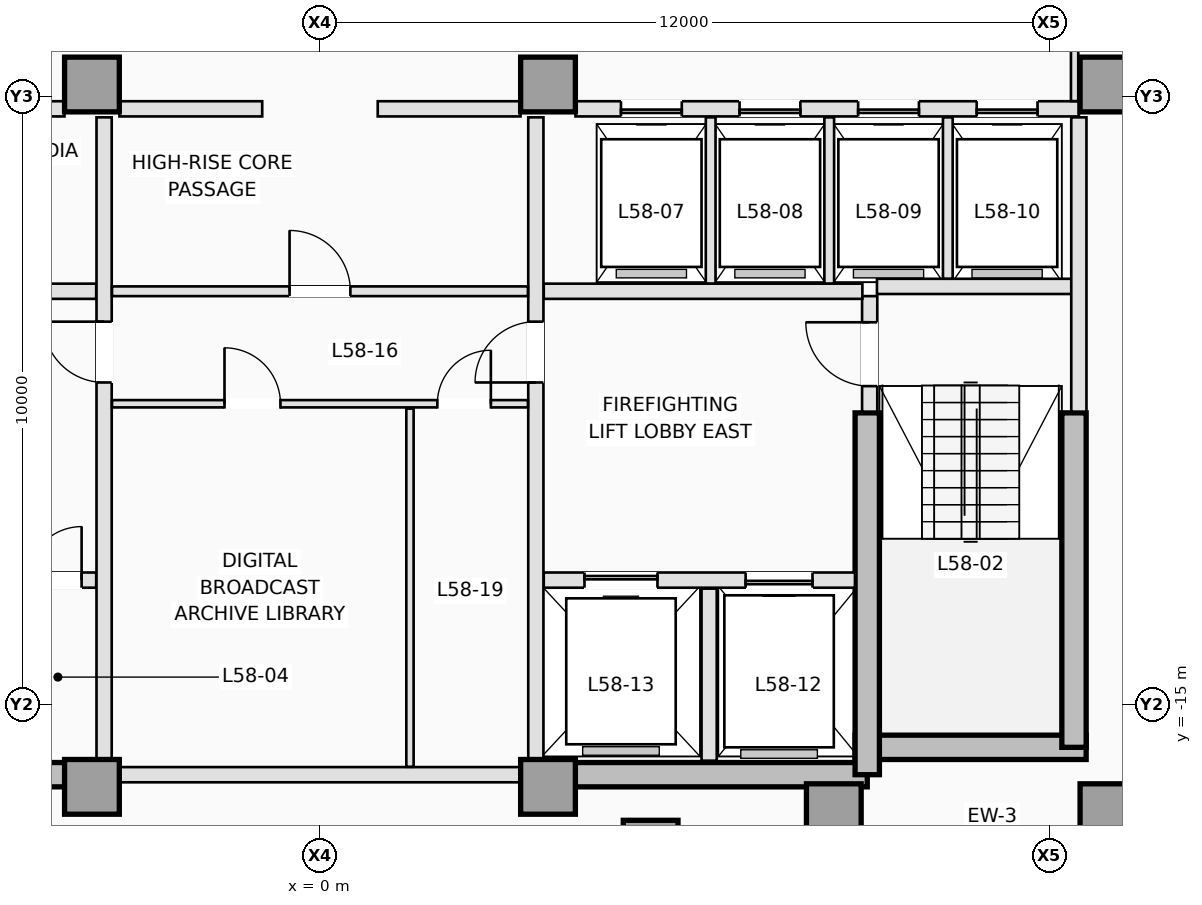
"""IFC4 building model, lengths in metres.
Left out: names, types, materials, properties, quantities, classifications, styles, units other than length and angle.
Written with IfcOpenShell. Run it as: python <this file> out.ifc"""

import sys

from ifc_helpers import new_model, si_unit, direction, frame, frame_2d, origin, origin_2d, place, context, subcontext, project, spatial, rectangle, extrude, element, fill, save


model = new_model("IFC4")
c1 = context("Model", 3, precision=1e-05, world=origin(), true_north=direction((0.0, 1.0)))
c2 = subcontext(c1, "Body", "Model", "MODEL_VIEW")
j1 = project(units=[si_unit("LENGTHUNIT", "METRE"), si_unit("PLANEANGLEUNIT", "RADIAN")], contexts=[c1])
p1 = place(None, origin())
s1 = spatial("IfcSite", under=j1, at=p1, CompositionType="ELEMENT")
p2 = place(p1, origin())
s2 = spatial("IfcBuilding", under=s1, at=p2, CompositionType="ELEMENT")
p3 = place(p2, frame((0.0, 0.0, 211.4)))
s3 = spatial("IfcBuildingStorey", under=s2, at=p3, CompositionType="ELEMENT", Elevation=211.4)
for number, where, z_axis, x_axis in (
    (1, (-9.0, -16.15, 0.0), (0.0, 0.0, 1.0), (1.0, 0.0, 0.0)),
    (2, (3.75, -16.15, 0.0), (0.0, 0.0, 1.0), (1.0, 0.0, 0.0)),
):
    element("IfcWall", number, at=place(p3, frame(where, z_axis=z_axis, x_axis=x_axis)), inside=s3, PredefinedType="SHEAR", context=c2, shape_type="SweptSolid", body=[
        extrude(rectangle(XDim=5.25, YDim=0.4, at=frame_2d((2.625, 0.0))), origin(), (0.0, 0.0, 1.0), 3.5),
    ])
p4 = place(p3, frame((8.8, -15.7, 0.0), z_axis=(0.0, 0.0, 1.0), x_axis=(1.0, 0.0, 0.0)))
e3 = element("IfcWall", 3, at=p4, inside=s3, PredefinedType="SHEAR", context=c2, shape_type="SweptSolid", body=[
    extrude(rectangle(XDim=3.8, YDim=0.4, at=frame_2d((1.9, 0.0))), origin(), (0.0, 0.0, 1.0), 3.5),
])
p5 = place(p3, frame((12.4, -15.7, 0.0), z_axis=(0.0, 0.0, 1.0), x_axis=(0.0, 1.0, 0.0)))
e4 = element("IfcWall", 4, at=p5, inside=s3, PredefinedType="SHEAR", context=c2, shape_type="SweptSolid", body=[
    extrude(rectangle(XDim=5.5, YDim=0.4, at=frame_2d((2.75, 0.0))), origin(), (0.0, 0.0, 1.0), 3.5),
])
p6 = place(p3, frame((9.0, -16.15, 0.0), z_axis=(0.0, 0.0, 1.0), x_axis=(0.0, 1.0, 0.0)))
e5 = element("IfcWall", 5, at=p6, inside=s3, PredefinedType="SHEAR", context=c2, shape_type="SweptSolid", body=[
    extrude(rectangle(XDim=5.95, YDim=0.4, at=frame_2d((2.975, 0.0))), origin(), (0.0, 0.0, 1.0), 3.5),
])
for number, where, z_axis, x_axis in (
    (6, (-3.75, -16.35, 0.0), (0.0, 0.0, 1.0), (1.0, 0.0, 0.0)),
    (7, (3.75, -16.35, 0.0), (0.0, 0.0, 1.0), (1.0, 0.0, 0.0)),
    (8, (8.45, -16.75, 0.0), (0.0, 0.0, 1.0), (1.0, 0.0, 0.0)),
    (9, (12.95, -16.75, 0.0), (0.0, 0.0, 1.0), (1.0, 0.0, 0.0)),
    (10, (-3.75, -4.8, 0.0), (0.0, 0.0, 1.0), (1.0, 0.0, 0.0)),
    (11, (3.75, -4.8, 0.0), (0.0, 0.0, 1.0), (1.0, 0.0, 0.0)),
    (12, (12.95, -4.8, 0.0), (0.0, 0.0, 1.0), (1.0, 0.0, 0.0)),
    (13, (5.438, -17.35, 0.0), (0.0, 0.0, 1.0), (0.0, 1.0, 0.0)),
):
    element("IfcColumn", number, at=place(p3, frame(where, z_axis=z_axis, x_axis=x_axis)), inside=s3, PredefinedType="COLUMN", context=c2, shape_type="SweptSolid", body=[
        extrude(rectangle(XDim=0.9, YDim=0.9, at=origin_2d()), origin(), (0.0, 0.0, 1.0), 3.5),
    ])
p7 = place(p3, frame((9.04, -10.18, 0.0), z_axis=(0.0, 0.0, 1.0), x_axis=(0.0, 1.0, 0.0)))
e14 = element("IfcWall", 14, at=p7, inside=s3, PredefinedType="PARTITIONING", context=c2, shape_type="SweptSolid", body=[
    extrude(rectangle(XDim=1.9, YDim=0.25, at=frame_2d((0.95, 0.0))), origin(), (0.0, 0.0, 1.0), 3.25),
])
p8 = place(p7, frame((0.42, 0.0, 0.0)))
e15 = element("IfcOpeningElement", 15, at=p8, cuts=e14, PredefinedType="OPENING", context=c2, shape_type="SweptSolid", body=[
    extrude(rectangle(XDim=1.05, YDim=2.15, at=frame_2d((0.525, 1.075))), frame((0.0, 0.135, 0.0), z_axis=(0.0, -1.0, 0.0), x_axis=(1.0, 0.0, 0.0)), (0.0, 0.0, 1.0), 0.27),
])
p9 = place(p3, frame((9.16, -8.12, 0.0), z_axis=(0.0, 0.0, 1.0), x_axis=(1.0, 0.0, 0.0)))
e16 = element("IfcWall", 16, at=p9, inside=s3, PredefinedType="PARTITIONING", context=c2, shape_type="SweptSolid", body=[
    extrude(rectangle(XDim=3.22, YDim=0.25, at=frame_2d((1.61, 0.0))), origin(), (0.0, 0.0, 1.0), 3.25),
])
p10 = place(p3, frame((12.48, -10.18, 0.0), z_axis=(0.0, 0.0, 1.0), x_axis=(0.0, 1.0, 0.0)))
e17 = element("IfcWall", 17, at=p10, inside=s3, PredefinedType="PARTITIONING", context=c2, shape_type="SweptSolid", body=[
    extrude(rectangle(XDim=4.84, YDim=0.25, at=frame_2d((2.42, 0.0))), origin(), (0.0, 0.0, 1.0), 3.25),
])
p11 = place(p3, frame((-8.798, -12.95, 0.0), z_axis=(0.0, 0.0, 1.0), x_axis=(1.0, 0.0, 0.0)))
e18 = element("IfcWall", 18, at=p11, inside=s3, PredefinedType="PARTITIONING", context=c2, shape_type="SweptSolid", body=[
    extrude(rectangle(XDim=5.118, YDim=0.25, at=frame_2d((2.559, 0.0))), origin(), (0.0, 0.0, 1.0), 3.25),
])
p12 = place(p11, frame((0.698, 0.0, 0.0)))
e19 = element("IfcOpeningElement", 19, at=p12, cuts=e18, PredefinedType="OPENING", context=c2, shape_type="SweptSolid", body=[
    extrude(rectangle(XDim=1.1, YDim=2.15, at=frame_2d((0.55, 1.075))), frame((0.0, 0.135, 0.0), z_axis=(0.0, -1.0, 0.0), x_axis=(1.0, 0.0, 0.0)), (0.0, 0.0, 1.0), 0.27),
])
p13 = place(p11, frame((2.598, 0.0, 0.0)))
e20 = element("IfcOpeningElement", 20, at=p13, cuts=e18, PredefinedType="OPENING", context=c2, shape_type="SweptSolid", body=[
    extrude(rectangle(XDim=0.88, YDim=2.1, at=frame_2d((0.44, 1.05))), frame((0.0, 0.135, 0.0), z_axis=(0.0, -1.0, 0.0), x_axis=(1.0, 0.0, 0.0)), (0.0, 0.0, 1.0), 0.27),
])
p14 = place(p11, frame((3.998, 0.0, 0.0)))
e21 = element("IfcOpeningElement", 21, at=p14, cuts=e18, PredefinedType="OPENING", context=c2, shape_type="SweptSolid", body=[
    extrude(rectangle(XDim=0.88, YDim=2.1, at=frame_2d((0.44, 1.05))), frame((0.0, 0.135, 0.0), z_axis=(0.0, -1.0, 0.0), x_axis=(1.0, 0.0, 0.0)), (0.0, 0.0, 1.0), 0.27),
])
p15 = place(p3, frame((3.68, -12.95, 0.0), z_axis=(0.0, 0.0, 1.0), x_axis=(1.0, 0.0, 0.0)))
e22 = element("IfcWall", 22, at=p15, inside=s3, PredefinedType="PARTITIONING", context=c2, shape_type="SweptSolid", body=[
    extrude(rectangle(XDim=5.118, YDim=0.25, at=frame_2d((2.559, 0.0))), origin(), (0.0, 0.0, 1.0), 3.25),
])
p16 = place(p15, frame((3.32, 0.0, 0.0)))
e23 = element("IfcOpeningElement", 23, at=p16, cuts=e22, PredefinedType="OPENING", context=c2, shape_type="SweptSolid", body=[
    extrude(rectangle(XDim=1.1, YDim=2.15, at=frame_2d((0.55, 1.075))), frame((0.0, 0.135, 0.0), z_axis=(0.0, -1.0, 0.0), x_axis=(1.0, 0.0, 0.0)), (0.0, 0.0, 1.0), 0.27),
])
p17 = place(p15, frame((0.67, 0.0, 0.0)))
e24 = element("IfcOpeningElement", 24, at=p17, cuts=e22, PredefinedType="OPENING", context=c2, shape_type="SweptSolid", body=[
    extrude(rectangle(XDim=1.2, YDim=2.15, at=frame_2d((0.6, 1.075))), frame((0.0, 0.135, 0.0), z_axis=(0.0, -1.0, 0.0), x_axis=(1.0, 0.0, 0.0)), (0.0, 0.0, 1.0), 0.27),
])
p18 = place(p3, frame((6.4, -15.92, 0.0), z_axis=(0.0, 0.0, 1.0), x_axis=(0.0, 1.0, 0.0)))
e25 = element("IfcWall", 25, at=p18, inside=s3, PredefinedType="PARTITIONING", context=c2, shape_type="SweptSolid", body=[
    extrude(rectangle(XDim=2.83, YDim=0.25, at=frame_2d((1.415, 0.0))), origin(), (0.0, 0.0, 1.0), 3.25),
])
for number, where, z_axis, x_axis in (
    (26, (-8.92, -8.2, 0.0), (0.0, 0.0, 1.0), (1.0, 0.0, 0.0)),
    (27, (3.68, -8.2, 0.0), (0.0, 0.0, 1.0), (1.0, 0.0, 0.0)),
):
    element("IfcWall", number, at=place(p3, frame(where, z_axis=z_axis, x_axis=x_axis)), inside=s3, PredefinedType="PARTITIONING", context=c2, shape_type="SweptSolid", body=[
        extrude(rectangle(XDim=5.24, YDim=0.25, at=frame_2d((2.62, 0.0))), origin(), (0.0, 0.0, 1.0), 3.25),
    ])
p19 = place(p3, frame((-3.55, -15.898, 0.0), z_axis=(0.0, 0.0, 1.0), x_axis=(0.0, 1.0, 0.0)))
e28 = element("IfcWall", 28, at=p19, inside=s3, PredefinedType="PARTITIONING", context=c2, shape_type="SweptSolid", body=[
    extrude(rectangle(XDim=10.558, YDim=0.25, at=frame_2d((5.279, 0.0))), origin(), (0.0, 0.0, 1.0), 3.25),
])
p20 = place(p19, frame((6.198, 0.0, 0.0)))
e29 = element("IfcOpeningElement", 29, at=p20, cuts=e28, PredefinedType="OPENING", context=c2, shape_type="SweptSolid", body=[
    extrude(rectangle(XDim=1.0, YDim=2.15, at=frame_2d((0.5, 1.075))), frame((0.0, 0.135, 0.0), z_axis=(0.0, -1.0, 0.0), x_axis=(1.0, 0.0, 0.0)), (0.0, 0.0, 1.0), 0.27),
])
p21 = place(p3, frame((3.55, -15.898, 0.0), z_axis=(0.0, 0.0, 1.0), x_axis=(0.0, 1.0, 0.0)))
e30 = element("IfcWall", 30, at=p21, inside=s3, PredefinedType="PARTITIONING", context=c2, shape_type="SweptSolid", body=[
    extrude(rectangle(XDim=10.558, YDim=0.25, at=frame_2d((5.279, 0.0))), origin(), (0.0, 0.0, 1.0), 3.25),
])
p22 = place(p21, frame((6.198, 0.0, 0.0)))
e31 = element("IfcOpeningElement", 31, at=p22, cuts=e30, PredefinedType="OPENING", context=c2, shape_type="SweptSolid", body=[
    extrude(rectangle(XDim=1.0, YDim=2.15, at=frame_2d((0.5, 1.075))), frame((0.0, 0.135, 0.0), z_axis=(0.0, -1.0, 0.0), x_axis=(1.0, 0.0, 0.0)), (0.0, 0.0, 1.0), 0.27),
])
p23 = place(p3, frame((-12.48, -5.2, 0.0), z_axis=(0.0, 0.0, 1.0), x_axis=(1.0, 0.0, 0.0)))
e32 = element("IfcWall", 32, at=p23, inside=s3, PredefinedType="PARTITIONING", context=c2, shape_type="SweptSolid", body=[
    extrude(rectangle(XDim=8.278, YDim=0.25, at=frame_2d((4.139, 0.0))), origin(), (0.0, 0.0, 1.0), 3.25),
])
p24 = place(p23, frame((3.05, 0.0, 0.0)))
e33 = element("IfcOpeningElement", 33, at=p24, cuts=e32, PredefinedType="OPENING", context=c2, shape_type="SweptSolid", body=[
    extrude(rectangle(XDim=0.92, YDim=2.12, at=frame_2d((0.46, 1.06))), frame((0.0, 0.135, 0.0), z_axis=(0.0, -1.0, 0.0), x_axis=(1.0, 0.0, 0.0)), (0.0, 0.0, 1.0), 0.27),
])
p25 = place(p23, frame((6.15, 0.0, 0.0)))
e34 = element("IfcOpeningElement", 34, at=p25, cuts=e32, PredefinedType="OPENING", context=c2, shape_type="SweptSolid", body=[
    extrude(rectangle(XDim=0.92, YDim=2.12, at=frame_2d((0.46, 1.06))), frame((0.0, 0.135, 0.0), z_axis=(0.0, -1.0, 0.0), x_axis=(1.0, 0.0, 0.0)), (0.0, 0.0, 1.0), 0.27),
])
p26 = place(p3, frame((4.202, -5.2, 0.0), z_axis=(0.0, 0.0, 1.0), x_axis=(1.0, 0.0, 0.0)))
e35 = element("IfcWall", 35, at=p26, inside=s3, PredefinedType="PARTITIONING", context=c2, shape_type="SweptSolid", body=[
    extrude(rectangle(XDim=8.278, YDim=0.25, at=frame_2d((4.139, 0.0))), origin(), (0.0, 0.0, 1.0), 3.25),
])
p27 = place(p26, frame((0.748, 0.0, 0.0)))
e36 = element("IfcOpeningElement", 36, at=p27, cuts=e35, PredefinedType="OPENING", context=c2, shape_type="SweptSolid", body=[
    extrude(rectangle(XDim=1.0, YDim=2.15, at=frame_2d((0.5, 1.075))), frame((0.0, 0.135, 0.0), z_axis=(0.0, -1.0, 0.0), x_axis=(1.0, 0.0, 0.0)), (0.0, 0.0, 1.0), 0.27),
])
p28 = place(p26, frame((2.698, 0.0, 0.0)))
e37 = element("IfcOpeningElement", 37, at=p28, cuts=e35, PredefinedType="OPENING", context=c2, shape_type="SweptSolid", body=[
    extrude(rectangle(XDim=1.0, YDim=2.15, at=frame_2d((0.5, 1.075))), frame((0.0, 0.135, 0.0), z_axis=(0.0, -1.0, 0.0), x_axis=(1.0, 0.0, 0.0)), (0.0, 0.0, 1.0), 0.27),
])
p29 = place(p26, frame((4.648, 0.0, 0.0)))
e38 = element("IfcOpeningElement", 38, at=p29, cuts=e35, PredefinedType="OPENING", context=c2, shape_type="SweptSolid", body=[
    extrude(rectangle(XDim=1.0, YDim=2.15, at=frame_2d((0.5, 1.075))), frame((0.0, 0.135, 0.0), z_axis=(0.0, -1.0, 0.0), x_axis=(1.0, 0.0, 0.0)), (0.0, 0.0, 1.0), 0.27),
])
p30 = place(p26, frame((6.598, 0.0, 0.0)))
e39 = element("IfcOpeningElement", 39, at=p30, cuts=e35, PredefinedType="OPENING", context=c2, shape_type="SweptSolid", body=[
    extrude(rectangle(XDim=1.0, YDim=2.15, at=frame_2d((0.5, 1.075))), frame((0.0, 0.135, 0.0), z_axis=(0.0, -1.0, 0.0), x_axis=(1.0, 0.0, 0.0)), (0.0, 0.0, 1.0), 0.27),
])
for number, where, z_axis, x_axis in (
    (40, (-3.298, -5.2, 0.0), (0.0, 0.0, 1.0), (1.0, 0.0, 0.0)),
    (41, (0.95, -5.2, 0.0), (0.0, 0.0, 1.0), (1.0, 0.0, 0.0)),
):
    element("IfcWall", number, at=place(p3, frame(where, z_axis=z_axis, x_axis=x_axis)), inside=s3, PredefinedType="PARTITIONING", context=c2, shape_type="SweptSolid", body=[
        extrude(rectangle(XDim=2.348, YDim=0.25, at=frame_2d((1.174, 0.0))), origin(), (0.0, 0.0, 1.0), 3.25),
    ])
for number, where, z_axis, x_axis in (
    (42, (6.425, -8.073, 0.0), (0.0, 0.0, 1.0), (0.0, 1.0, 0.0)),
    (43, (8.375, -8.073, 0.0), (0.0, 0.0, 1.0), (0.0, 1.0, 0.0)),
):
    element("IfcWall", number, at=place(p3, frame(where, z_axis=z_axis, x_axis=x_axis)), inside=s3, PredefinedType="PARTITIONING", context=c2, shape_type="SweptSolid", body=[
        extrude(rectangle(XDim=2.733, YDim=0.16, at=frame_2d((1.366, 0.0))), origin(), (0.0, 0.0, 1.0), 3.25),
    ])
p31 = place(p3, frame((10.325, -7.993, 0.0), z_axis=(0.0, 0.0, 1.0), x_axis=(0.0, 1.0, 0.0)))
e44 = element("IfcWall", 44, at=p31, inside=s3, PredefinedType="PARTITIONING", context=c2, shape_type="SweptSolid", body=[
    extrude(rectangle(XDim=2.653, YDim=0.16, at=frame_2d((1.326, 0.0))), origin(), (0.0, 0.0, 1.0), 3.25),
])
p32 = place(p3, frame((-3.298, -16.15, 0.0), z_axis=(0.0, 0.0, 1.0), x_axis=(1.0, 0.0, 0.0)))
e45 = element("IfcWall", 45, at=p32, inside=s3, PredefinedType="PARTITIONING", context=c2, shape_type="SweptSolid", body=[
    extrude(rectangle(XDim=6.596, YDim=0.25, at=frame_2d((3.298, 0.0))), origin(), (0.0, 0.0, 1.0), 2.45),
])
p33 = place(p3, frame((-3.42, -8.2, 0.0), z_axis=(0.0, 0.0, 1.0), x_axis=(1.0, 0.0, 0.0)))
e46 = element("IfcWall", 46, at=p33, inside=s3, PredefinedType="PARTITIONING", context=c2, shape_type="SweptSolid", body=[
    extrude(rectangle(XDim=6.84, YDim=0.16, at=frame_2d((3.42, 0.0))), origin(), (0.0, 0.0, 1.0), 3.25),
])
p34 = place(p33, frame((2.92, 0.0, 0.0)))
e47 = element("IfcOpeningElement", 47, at=p34, cuts=e46, PredefinedType="OPENING", context=c2, shape_type="SweptSolid", body=[
    extrude(rectangle(XDim=1.0, YDim=2.15, at=frame_2d((0.5, 1.075))), frame((0.0, 0.09, 0.0), z_axis=(0.0, -1.0, 0.0), x_axis=(1.0, 0.0, 0.0)), (0.0, 0.0, 1.0), 0.18),
])
p35 = place(p3, frame((-3.42, -10.05, 0.0), z_axis=(0.0, 0.0, 1.0), x_axis=(1.0, 0.0, 0.0)))
e48 = element("IfcWall", 48, at=p35, inside=s3, PredefinedType="PARTITIONING", context=c2, shape_type="SweptSolid", body=[
    extrude(rectangle(XDim=6.84, YDim=0.12, at=frame_2d((3.42, 0.0))), origin(), (0.0, 0.0, 1.0), 3.25),
])
p36 = place(p35, frame((1.85, 0.0, 0.0)))
e49 = element("IfcOpeningElement", 49, at=p36, cuts=e48, PredefinedType="OPENING", context=c2, shape_type="SweptSolid", body=[
    extrude(rectangle(XDim=0.92, YDim=2.12, at=frame_2d((0.46, 1.06))), frame((0.0, 0.07, 0.0), z_axis=(0.0, -1.0, 0.0), x_axis=(1.0, 0.0, 0.0)), (0.0, 0.0, 1.0), 0.14),
])
p37 = place(p35, frame((5.35, 0.0, 0.0)))
e50 = element("IfcOpeningElement", 50, at=p37, cuts=e48, PredefinedType="OPENING", context=c2, shape_type="SweptSolid", body=[
    extrude(rectangle(XDim=0.88, YDim=2.12, at=frame_2d((0.44, 1.06))), frame((0.0, 0.07, 0.0), z_axis=(0.0, -1.0, 0.0), x_axis=(1.0, 0.0, 0.0)), (0.0, 0.0, 1.0), 0.14),
])
p38 = place(p3, frame((1.48, -16.02, 0.0), z_axis=(0.0, 0.0, 1.0), x_axis=(0.0, 1.0, 0.0)))
e51 = element("IfcWall", 51, at=p38, inside=s3, PredefinedType="PARTITIONING", context=c2, shape_type="SweptSolid", body=[
    extrude(rectangle(XDim=5.89, YDim=0.12, at=frame_2d((2.945, 0.0))), origin(), (0.0, 0.0, 1.0), 3.25),
])
p39 = place(p3, frame((12.41, -2.462, 0.0), z_axis=(0.0, 0.0, 1.0), x_axis=(0.0, -1.0, 0.0)))
e52 = element("IfcWall", 52, at=p39, inside=s3, PredefinedType="PARTITIONING", context=c2, shape_type="SweptSolid", body=[
    extrude(rectangle(XDim=2.611, YDim=0.12, at=frame_2d((1.306, 0.0))), origin(), (0.0, 0.0, 1.0), 3.25),
])
p40 = place(p27, origin())
e53 = element("IfcDoor", 53, at=p40, inside=s3, OperationType="SLIDING_TO_RIGHT", PredefinedType="DOOR", context=c2, shape_type="SweptSolid", body=[
    extrude(rectangle(XDim=1.0, YDim=2.15, at=frame_2d((0.5, 1.075))), frame((0.0, 0.025, 0.0), z_axis=(0.0, -1.0, 0.0), x_axis=(1.0, 0.0, 0.0)), (0.0, 0.0, 1.0), 0.05),
])
fill(e36, e53)
p41 = place(p28, origin())
e54 = element("IfcDoor", 54, at=p41, inside=s3, OperationType="SLIDING_TO_RIGHT", PredefinedType="DOOR", context=c2, shape_type="SweptSolid", body=[
    extrude(rectangle(XDim=1.0, YDim=2.15, at=frame_2d((0.5, 1.075))), frame((0.0, 0.025, 0.0), z_axis=(0.0, -1.0, 0.0), x_axis=(1.0, 0.0, 0.0)), (0.0, 0.0, 1.0), 0.05),
])
fill(e37, e54)
p42 = place(p29, origin())
e55 = element("IfcDoor", 55, at=p42, inside=s3, OperationType="SLIDING_TO_RIGHT", PredefinedType="DOOR", context=c2, shape_type="SweptSolid", body=[
    extrude(rectangle(XDim=1.0, YDim=2.15, at=frame_2d((0.5, 1.075))), frame((0.0, 0.025, 0.0), z_axis=(0.0, -1.0, 0.0), x_axis=(1.0, 0.0, 0.0)), (0.0, 0.0, 1.0), 0.05),
])
fill(e38, e55)
p43 = place(p30, origin())
e56 = element("IfcDoor", 56, at=p43, inside=s3, OperationType="SLIDING_TO_RIGHT", PredefinedType="DOOR", context=c2, shape_type="SweptSolid", body=[
    extrude(rectangle(XDim=1.0, YDim=2.15, at=frame_2d((0.5, 1.075))), frame((0.0, 0.025, 0.0), z_axis=(0.0, -1.0, 0.0), x_axis=(1.0, 0.0, 0.0)), (0.0, 0.0, 1.0), 0.05),
])
fill(e39, e56)
p44 = place(p16, origin())
e57 = element("IfcDoor", 57, at=p44, inside=s3, OperationType="SLIDING_TO_RIGHT", PredefinedType="DOOR", context=c2, shape_type="SweptSolid", body=[
    extrude(rectangle(XDim=1.1, YDim=2.15, at=frame_2d((0.55, 1.075))), frame((0.0, 0.025, 0.0), z_axis=(0.0, -1.0, 0.0), x_axis=(1.0, 0.0, 0.0)), (0.0, 0.0, 1.0), 0.05),
])
fill(e23, e57)
p45 = place(p17, origin())
e58 = element("IfcDoor", 58, at=p45, inside=s3, OperationType="SLIDING_TO_LEFT", PredefinedType="DOOR", context=c2, shape_type="SweptSolid", body=[
    extrude(rectangle(XDim=1.2, YDim=2.15, at=frame_2d((0.6, 1.075))), frame((0.0, 0.025, 0.0), z_axis=(0.0, -1.0, 0.0), x_axis=(1.0, 0.0, 0.0)), (0.0, 0.0, 1.0), 0.05),
])
fill(e24, e58)
p46 = place(p8, origin())
e59 = element("IfcDoor", 59, at=p46, inside=s3, OperationType="SINGLE_SWING_RIGHT", PredefinedType="DOOR", context=c2, shape_type="SweptSolid", body=[
    extrude(rectangle(XDim=1.05, YDim=2.15, at=frame_2d((0.525, 1.075))), frame((0.0, 0.025, 0.0), z_axis=(0.0, -1.0, 0.0), x_axis=(1.0, 0.0, 0.0)), (0.0, 0.0, 1.0), 0.05),
])
fill(e15, e59)
p47 = place(p14, origin())
e60 = element("IfcDoor", 60, at=p47, inside=s3, OperationType="SINGLE_SWING_RIGHT", PredefinedType="TRAPDOOR", context=c2, shape_type="SweptSolid", body=[
    extrude(rectangle(XDim=0.88, YDim=2.1, at=frame_2d((0.44, 1.05))), frame((0.0, 0.025, 0.0), z_axis=(0.0, -1.0, 0.0), x_axis=(1.0, 0.0, 0.0)), (0.0, 0.0, 1.0), 0.05),
])
fill(e21, e60)
p48 = place(p20, origin())
e61 = element("IfcDoor", 61, at=p48, inside=s3, OperationType="SINGLE_SWING_RIGHT", PredefinedType="DOOR", context=c2, shape_type="SweptSolid", body=[
    extrude(rectangle(XDim=1.0, YDim=2.15, at=frame_2d((0.5, 1.075))), frame((0.0, 0.025, 0.0), z_axis=(0.0, -1.0, 0.0), x_axis=(1.0, 0.0, 0.0)), (0.0, 0.0, 1.0), 0.05),
])
fill(e29, e61)
p49 = place(p22, origin())
e62 = element("IfcDoor", 62, at=p49, inside=s3, OperationType="SINGLE_SWING_LEFT", PredefinedType="DOOR", context=c2, shape_type="SweptSolid", body=[
    extrude(rectangle(XDim=1.0, YDim=2.15, at=frame_2d((0.5, 1.075))), frame((0.0, 0.025, 0.0), z_axis=(0.0, -1.0, 0.0), x_axis=(1.0, 0.0, 0.0)), (0.0, 0.0, 1.0), 0.05),
])
fill(e31, e62)
p50 = place(p34, origin())
e63 = element("IfcDoor", 63, at=p50, inside=s3, OperationType="SINGLE_SWING_LEFT", PredefinedType="DOOR", context=c2, shape_type="SweptSolid", body=[
    extrude(rectangle(XDim=1.0, YDim=2.15, at=frame_2d((0.5, 1.075))), frame((0.0, 0.025, 0.0), z_axis=(0.0, -1.0, 0.0), x_axis=(1.0, 0.0, 0.0)), (0.0, 0.0, 1.0), 0.05),
])
fill(e47, e63)
p51 = place(p36, origin())
e64 = element("IfcDoor", 64, at=p51, inside=s3, OperationType="SINGLE_SWING_LEFT", PredefinedType="DOOR", context=c2, shape_type="SweptSolid", body=[
    extrude(rectangle(XDim=0.92, YDim=2.12, at=frame_2d((0.46, 1.06))), frame((0.0, 0.025, 0.0), z_axis=(0.0, -1.0, 0.0), x_axis=(1.0, 0.0, 0.0)), (0.0, 0.0, 1.0), 0.05),
])
fill(e49, e64)
p52 = place(p37, origin())
e65 = element("IfcDoor", 65, at=p52, inside=s3, OperationType="SINGLE_SWING_RIGHT", PredefinedType="DOOR", context=c2, shape_type="SweptSolid", body=[
    extrude(rectangle(XDim=0.88, YDim=2.12, at=frame_2d((0.44, 1.06))), frame((0.0, 0.025, 0.0), z_axis=(0.0, -1.0, 0.0), x_axis=(1.0, 0.0, 0.0)), (0.0, 0.0, 1.0), 0.05),
])
fill(e50, e65)
save(model, sys.argv[1])
